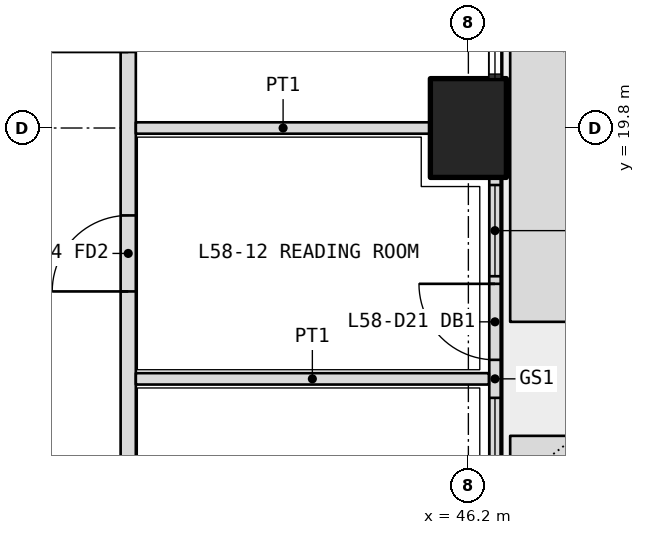
"""IFC4 building model, lengths in metres.
Left out: names, types, materials, properties, quantities, classifications, styles, units other than length and angle.
Written with IfcOpenShell. Run it as: python <this file> out.ifc"""

import sys

from ifc_helpers import new_model, si_unit, direction, frame, frame_2d, origin, origin_2d, place, context, subcontext, project, spatial, polyline, rectangle, outline, extrude, element, fill, save


model = new_model("IFC4")
c1 = context("Model", 3, precision=1e-05, world=origin(), true_north=direction((0.0, 1.0)))
c2 = subcontext(c1, "Body", "Model", "MODEL_VIEW")
j1 = project(units=[si_unit("LENGTHUNIT", "METRE"), si_unit("PLANEANGLEUNIT", "RADIAN")], contexts=[c1])
p1 = place(None, origin())
s1 = spatial("IfcSite", under=j1, at=p1, CompositionType="ELEMENT")
p2 = place(p1, origin())
s2 = spatial("IfcBuilding", under=s1, at=p2, CompositionType="ELEMENT")
p3 = place(p2, frame((0.0, 0.0, 254.4)))
s3 = spatial("IfcBuildingStorey", under=s2, at=p3, CompositionType="ELEMENT", Elevation=254.4)
p4 = place(p3, frame((46.2, 19.8, 0.0), z_axis=(0.0, 0.0, 1.0), x_axis=(0.0, 1.0, 0.0)))
e1 = element("IfcColumn", 1, at=p4, inside=s3, PredefinedType="COLUMN", context=c2, shape_type="SweptSolid", body=[
    extrude(rectangle(XDim=1.3, YDim=1.0, at=origin_2d()), origin(), (0.0, 0.0, 1.0), 4.2),
])
p5 = place(p3, origin())
e2 = element("IfcWall", 2, at=p5, inside=s3, PredefinedType="USERDEFINED", context=c2, shape_type="SweptSolid", body=[
    extrude(outline(polyline([(46.75, 13.3), (47.75, 13.3), (47.75, 15.75), (46.75, 15.75), (46.75, 13.3)]), holes=[polyline([(46.9, 13.45), (47.6, 13.45), (47.6, 15.6), (46.9, 15.6), (46.9, 13.45)])]), origin(), (0.0, 0.0, 1.0), 1.05),
])
p6 = place(p3, origin())
e3 = element("IfcWall", 3, at=p6, inside=s3, PredefinedType="USERDEFINED", context=c2, shape_type="SweptSolid", body=[
    extrude(outline(polyline([(46.75, 17.25), (47.75, 17.25), (47.75, 26.3), (46.75, 26.3), (46.75, 17.25)]), holes=[polyline([(46.9, 17.4), (47.6, 17.4), (47.6, 26.15), (46.9, 26.15), (46.9, 17.4)])]), origin(), (0.0, 0.0, 1.0), 1.05),
])
p7 = place(p3, frame((46.55, 13.85, 0.0), z_axis=(0.0, 0.0, 1.0), x_axis=(0.0, 1.0, 0.0)))
e4 = element("IfcWall", 4, at=p7, inside=s3, PredefinedType="SOLIDWALL", context=c2, shape_type="SweptSolid", body=[
    extrude(rectangle(XDim=5.3, YDim=0.15, at=frame_2d((2.65, 0.0))), origin(), (0.0, 0.0, 1.0), 2.7),
])
p8 = place(p7, frame((2.9, 0.0, 0.0)))
e5 = element("IfcOpeningElement", 5, at=p8, cuts=e4, PredefinedType="OPENING", context=c2, shape_type="SweptSolid", body=[
    extrude(rectangle(XDim=1.0, YDim=2.4, at=frame_2d((0.5, 1.2))), frame((0.0, 0.085, 0.0), z_axis=(0.0, -1.0, 0.0), x_axis=(1.0, 0.0, 0.0)), (0.0, 0.0, 1.0), 0.17),
])
p9 = place(p7, frame((0.1, 0.0, 0.1)))
e6 = element("IfcOpeningElement", 6, at=p9, cuts=e4, PredefinedType="OPENING", context=c2, shape_type="SweptSolid", body=[
    extrude(rectangle(XDim=2.3, YDim=2.3, at=frame_2d((1.15, 1.15))), frame((0.0, 0.085, 0.0), z_axis=(0.0, -1.0, 0.0), x_axis=(1.0, 0.0, 0.0)), (0.0, 0.0, 1.0), 0.17),
])
p10 = place(p7, frame((4.0, 0.0, 0.1)))
e7 = element("IfcOpeningElement", 7, at=p10, cuts=e4, PredefinedType="OPENING", context=c2, shape_type="SweptSolid", body=[
    extrude(rectangle(XDim=1.2, YDim=2.3, at=frame_2d((0.6, 1.15))), frame((0.0, 0.085, 0.0), z_axis=(0.0, -1.0, 0.0), x_axis=(1.0, 0.0, 0.0)), (0.0, 0.0, 1.0), 0.17),
])
p11 = place(p3, frame((41.725, 7.4, 0.0), z_axis=(0.0, 0.0, 1.0), x_axis=(0.0, 1.0, 0.0)))
e8 = element("IfcWall", 8, at=p11, inside=s3, PredefinedType="PARTITIONING", context=c2, shape_type="SweptSolid", body=[
    extrude(rectangle(XDim=31.4, YDim=0.2, at=frame_2d((15.7, 0.0))), origin(), (0.0, 0.0, 1.0), 3.0),
])
p12 = place(p11, frame((4.0, 0.0, 0.0)))
e9 = element("IfcOpeningElement", 9, at=p12, cuts=e8, PredefinedType="OPENING", context=c2, shape_type="SweptSolid", body=[
    extrude(rectangle(XDim=1.0, YDim=2.1, at=frame_2d((0.5, 1.05))), frame((0.0, 0.11, 0.0), z_axis=(0.0, -1.0, 0.0), x_axis=(1.0, 0.0, 0.0)), (0.0, 0.0, 1.0), 0.22),
])
p13 = place(p11, frame((10.25, 0.0, 0.0)))
e10 = element("IfcOpeningElement", 10, at=p13, cuts=e8, PredefinedType="OPENING", context=c2, shape_type="SweptSolid", body=[
    extrude(rectangle(XDim=1.0, YDim=2.1, at=frame_2d((0.5, 1.05))), frame((0.0, 0.11, 0.0), z_axis=(0.0, -1.0, 0.0), x_axis=(1.0, 0.0, 0.0)), (0.0, 0.0, 1.0), 0.22),
])
p14 = place(p11, frame((13.4, 0.0, 0.0)))
e11 = element("IfcOpeningElement", 11, at=p14, cuts=e8, PredefinedType="OPENING", context=c2, shape_type="SweptSolid", body=[
    extrude(rectangle(XDim=1.0, YDim=2.1, at=frame_2d((0.5, 1.05))), frame((0.0, 0.11, 0.0), z_axis=(0.0, -1.0, 0.0), x_axis=(1.0, 0.0, 0.0)), (0.0, 0.0, 1.0), 0.22),
])
p15 = place(p11, frame((16.75, 0.0, 0.0)))
e12 = element("IfcOpeningElement", 12, at=p15, cuts=e8, PredefinedType="OPENING", context=c2, shape_type="SweptSolid", body=[
    extrude(rectangle(XDim=0.9, YDim=2.1, at=frame_2d((0.45, 1.05))), frame((0.0, 0.11, 0.0), z_axis=(0.0, -1.0, 0.0), x_axis=(1.0, 0.0, 0.0)), (0.0, 0.0, 1.0), 0.22),
])
p16 = place(p11, frame((20.05, 0.0, 0.0)))
e13 = element("IfcOpeningElement", 13, at=p16, cuts=e8, PredefinedType="OPENING", context=c2, shape_type="SweptSolid", body=[
    extrude(rectangle(XDim=1.2, YDim=2.1, at=frame_2d((0.6, 1.05))), frame((0.0, 0.11, 0.0), z_axis=(0.0, -1.0, 0.0), x_axis=(1.0, 0.0, 0.0)), (0.0, 0.0, 1.0), 0.22),
])
p17 = place(p11, frame((26.3, 0.0, 0.0)))
e14 = element("IfcOpeningElement", 14, at=p17, cuts=e8, PredefinedType="OPENING", context=c2, shape_type="SweptSolid", body=[
    extrude(rectangle(XDim=1.2, YDim=2.1, at=frame_2d((0.6, 1.05))), frame((0.0, 0.11, 0.0), z_axis=(0.0, -1.0, 0.0), x_axis=(1.0, 0.0, 0.0)), (0.0, 0.0, 1.0), 0.22),
])
p18 = place(p3, frame((46.47, 16.5, 0.0), z_axis=(0.0, 0.0, 1.0), x_axis=(-1.0, 0.0, 0.0)))
e15 = element("IfcWall", 15, at=p18, inside=s3, PredefinedType="PARTITIONING", context=c2, shape_type="SweptSolid", body=[
    extrude(rectangle(XDim=4.645, YDim=0.15, at=frame_2d((2.323, 0.0))), origin(), (0.0, 0.0, 1.0), 2.7),
])
p19 = place(p3, frame((45.7, 19.8, 0.0), z_axis=(0.0, 0.0, 1.0), x_axis=(-1.0, 0.0, 0.0)))
e16 = element("IfcWall", 16, at=p19, inside=s3, PredefinedType="PARTITIONING", context=c2, shape_type="SweptSolid", body=[
    extrude(rectangle(XDim=3.875, YDim=0.15, at=frame_2d((1.938, 0.0))), origin(), (0.0, 0.0, 1.0), 3.0),
])
p20 = place(p8, origin())
e17 = element("IfcDoor", 17, at=p20, inside=s3, OperationType="SINGLE_SWING_RIGHT", PredefinedType="DOOR", context=c2, shape_type="SweptSolid", body=[
    extrude(rectangle(XDim=1.0, YDim=2.4, at=frame_2d((0.5, 1.2))), frame((0.0, 0.025, 0.0), z_axis=(0.0, -1.0, 0.0), x_axis=(1.0, 0.0, 0.0)), (0.0, 0.0, 1.0), 0.05),
])
fill(e5, e17)
p21 = place(p9, origin())
e18 = element("IfcWindow", 18, at=p21, inside=s3, PartitioningType="SINGLE_PANEL", PredefinedType="WINDOW", context=c2, shape_type="SweptSolid", body=[
    extrude(rectangle(XDim=2.3, YDim=2.3, at=frame_2d((1.15, 1.15))), frame((0.0, 0.03, 0.0), z_axis=(0.0, -1.0, 0.0), x_axis=(1.0, 0.0, 0.0)), (0.0, 0.0, 1.0), 0.06),
])
fill(e6, e18)
p22 = place(p10, origin())
e19 = element("IfcWindow", 19, at=p22, inside=s3, PartitioningType="SINGLE_PANEL", PredefinedType="WINDOW", context=c2, shape_type="SweptSolid", body=[
    extrude(rectangle(XDim=1.2, YDim=2.3, at=frame_2d((0.6, 1.15))), frame((0.0, 0.03, 0.0), z_axis=(0.0, -1.0, 0.0), x_axis=(1.0, 0.0, 0.0)), (0.0, 0.0, 1.0), 0.06),
])
fill(e7, e19)
p23 = place(p13, origin())
e20 = element("IfcDoor", 20, at=p23, inside=s3, OperationType="SINGLE_SWING_LEFT", PredefinedType="DOOR", context=c2, shape_type="SweptSolid", body=[
    extrude(rectangle(XDim=1.0, YDim=2.1, at=frame_2d((0.5, 1.05))), frame((0.0, 0.025, 0.0), z_axis=(0.0, -1.0, 0.0), x_axis=(1.0, 0.0, 0.0)), (0.0, 0.0, 1.0), 0.05),
])
fill(e10, e20)
p24 = place(p14, origin())
e21 = element("IfcDoor", 21, at=p24, inside=s3, OperationType="SINGLE_SWING_LEFT", PredefinedType="DOOR", context=c2, shape_type="SweptSolid", body=[
    extrude(rectangle(XDim=1.0, YDim=2.1, at=frame_2d((0.5, 1.05))), frame((0.0, 0.025, 0.0), z_axis=(0.0, -1.0, 0.0), x_axis=(1.0, 0.0, 0.0)), (0.0, 0.0, 1.0), 0.05),
])
fill(e11, e21)
save(model, sys.argv[1])
